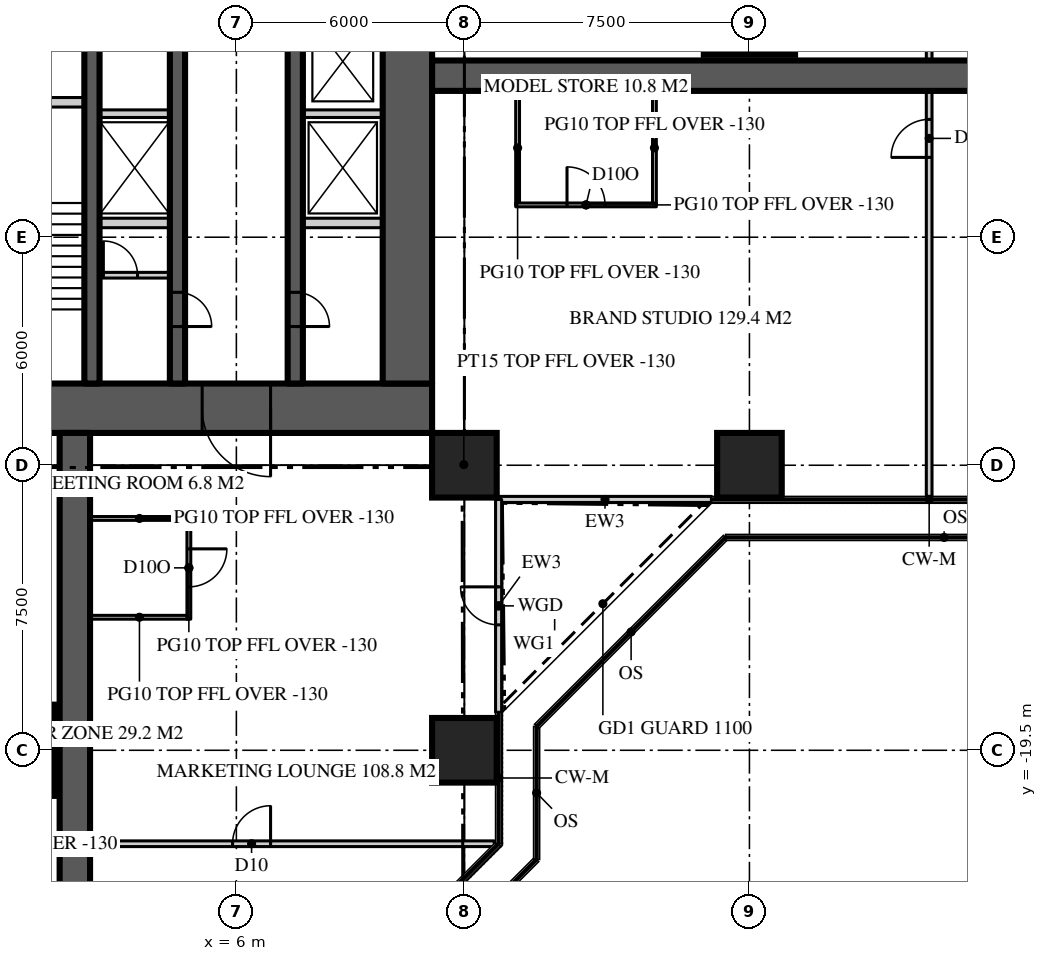
"""IFC4 building model, lengths in metres.
Left out: names, types, materials, properties, quantities, classifications, styles, units other than length and angle.
Written with IfcOpenShell. Run it as: python <this file> out.ifc"""

import sys

from ifc_helpers import new_model, si_unit, direction, frame, frame_2d, origin, origin_2d, place, context, subcontext, project, spatial, rectangle, extrude, element, fill, save


model = new_model("IFC4")
c1 = context("Model", 3, precision=1e-05, world=origin(), true_north=direction((0.0, 1.0)))
c2 = subcontext(c1, "Body", "Model", "MODEL_VIEW")
j1 = project(units=[si_unit("LENGTHUNIT", "METRE"), si_unit("PLANEANGLEUNIT", "RADIAN")], contexts=[c1])
p1 = place(None, origin())
s1 = spatial("IfcSite", under=j1, at=p1, CompositionType="ELEMENT")
p2 = place(p1, origin())
s2 = spatial("IfcBuilding", under=s1, at=p2, CompositionType="ELEMENT")
p3 = place(p2, frame((0.0, 0.0, 190.5)))
s3 = spatial("IfcBuildingStorey", under=s2, at=p3, CompositionType="ELEMENT", Elevation=190.5)
p4 = place(p3, frame((11.15, -10.5, 0.0), z_axis=(0.0, 0.0, 1.0), x_axis=(-1.0, 0.0, 0.0)))
e1 = element("IfcWall", 1, at=p4, inside=s3, PredefinedType="SHEAR", context=c2, shape_type="SweptSolid", body=[
    extrude(rectangle(XDim=22.3, YDim=1.3, at=frame_2d((11.15, 0.0))), origin(), (0.0, 0.0, 1.0), 3.9),
])
p5 = place(p4, frame((16.25, 0.0, 0.0)))
e2 = element("IfcOpeningElement", 2, at=p5, cuts=e1, PredefinedType="OPENING", context=c2, shape_type="SweptSolid", body=[
    extrude(rectangle(XDim=1.8, YDim=2.2, at=frame_2d((0.9, 1.1))), frame((0.0, 0.66, 0.0), z_axis=(0.0, -1.0, 0.0), x_axis=(1.0, 0.0, 0.0)), (0.0, 0.0, 1.0), 1.32),
])
p6 = place(p4, frame((4.25, 0.0, 0.0)))
e3 = element("IfcOpeningElement", 3, at=p6, cuts=e1, PredefinedType="OPENING", context=c2, shape_type="SweptSolid", body=[
    extrude(rectangle(XDim=1.8, YDim=2.2, at=frame_2d((0.9, 1.1))), frame((0.0, 0.66, 0.0), z_axis=(0.0, -1.0, 0.0), x_axis=(1.0, 0.0, 0.0)), (0.0, 0.0, 1.0), 1.32),
])
p7 = place(p3, frame((10.5, -9.85, 0.0), z_axis=(0.0, 0.0, 1.0), x_axis=(0.0, 1.0, 0.0)))
e4 = element("IfcWall", 4, at=p7, inside=s3, PredefinedType="SHEAR", context=c2, shape_type="SweptSolid", body=[
    extrude(rectangle(XDim=19.7, YDim=1.3, at=frame_2d((9.85, 0.0))), origin(), (0.0, 0.0, 1.0), 3.9),
])
p8 = place(p7, frame((17.25, 0.0, 0.0)))
e5 = element("IfcOpeningElement", 5, at=p8, cuts=e4, PredefinedType="OPENING", context=c2, shape_type="SweptSolid", body=[
    extrude(rectangle(XDim=1.0, YDim=2.2, at=frame_2d((0.5, 1.1))), frame((0.0, 0.66, 0.0), z_axis=(0.0, -1.0, 0.0), x_axis=(1.0, 0.0, 0.0)), (0.0, 0.0, 1.0), 1.32),
])
for number, where, z_axis, x_axis in (
    (6, (11.15, -1.75, 0.0), (0.0, 0.0, 1.0), (1.0, 0.0, 0.0)),
    (7, (1.75, -11.15, 0.0), (0.0, 0.0, 1.0), (0.0, -1.0, 0.0)),
):
    element("IfcWall", number, at=place(p3, frame(where, z_axis=z_axis, x_axis=x_axis)), inside=s3, PredefinedType="SHEAR", context=c2, shape_type="SweptSolid", body=[
        extrude(rectangle(XDim=15.25, YDim=0.8, at=frame_2d((7.625, 0.0))), origin(), (0.0, 0.0, 1.0), 3.9),
    ])
p9 = place(p3, frame((0.0, -19.5, 0.0), z_axis=(0.0, 0.0, 1.0), x_axis=(1.0, 0.0, 0.0)))
e8 = element("IfcColumn", 8, at=p9, inside=s3, PredefinedType="COLUMN", context=c2, shape_type="SweptSolid", body=[
    extrude(rectangle(XDim=2.4, YDim=2.4, at=origin_2d()), origin(), (0.0, 0.0, 1.0), 3.9),
])
for number, where, z_axis, x_axis in (
    (9, (12.0, -19.5, 0.0), (0.0, 0.0, 1.0), (1.0, 0.0, 0.0)),
    (10, (12.0, -12.0, 0.0), (0.0, 0.0, 1.0), (1.0, 0.0, 0.0)),
    (11, (19.5, -12.0, 0.0), (0.0, 0.0, 1.0), (1.0, 0.0, 0.0)),
):
    element("IfcColumn", number, at=place(p3, frame(where, z_axis=z_axis, x_axis=x_axis)), inside=s3, PredefinedType="COLUMN", context=c2, shape_type="SweptSolid", body=[
        extrude(rectangle(XDim=1.7, YDim=1.7, at=origin_2d()), origin(), (0.0, 0.0, 1.0), 3.9),
    ])
p10 = place(p3, frame((19.5, 0.0, 0.0), z_axis=(0.0, 0.0, 1.0), x_axis=(1.0, 0.0, 0.0)))
e12 = element("IfcColumn", 12, at=p10, inside=s3, PredefinedType="COLUMN", context=c2, shape_type="SweptSolid", body=[
    extrude(rectangle(XDim=2.4, YDim=2.4, at=origin_2d()), origin(), (0.0, 0.0, 1.0), 3.9),
])
p11 = place(p3, frame((12.9, -12.9, 0.0), z_axis=(0.0, 0.0, 1.0), x_axis=(1.0, 0.0, 0.0)))
e13 = element("IfcWall", 13, at=p11, inside=s3, PredefinedType="SOLIDWALL", context=c2, shape_type="SweptSolid", body=[
    extrude(rectangle(XDim=5.6, YDim=0.16, at=frame_2d((2.8, 0.0))), origin(), (0.0, 0.0, 1.0), 3.77),
])
p12 = place(p3, frame((12.9, -18.5, 0.0), z_axis=(0.0, 0.0, 1.0), x_axis=(0.0, 1.0, 0.0)))
e14 = element("IfcWall", 14, at=p12, inside=s3, PredefinedType="SOLIDWALL", context=c2, shape_type="SweptSolid", body=[
    extrude(rectangle(XDim=5.6, YDim=0.16, at=frame_2d((2.8, 0.0))), origin(), (0.0, 0.0, 1.0), 3.77),
])
p13 = place(p12, frame((2.3, 0.0, 0.0)))
e15 = element("IfcOpeningElement", 15, at=p13, cuts=e14, PredefinedType="OPENING", context=c2, shape_type="SweptSolid", body=[
    extrude(rectangle(XDim=1.0, YDim=2.2, at=frame_2d((0.5, 1.1))), frame((0.0, 0.09, 0.0), z_axis=(0.0, -1.0, 0.0), x_axis=(1.0, 0.0, 0.0)), (0.0, 0.0, 1.0), 0.18),
])
p14 = place(p3, frame((7.55, 9.85, 0.0), z_axis=(0.0, 0.0, 1.0), x_axis=(0.0, -1.0, 0.0)))
e16 = element("IfcWall", 16, at=p14, inside=s3, PredefinedType="SHEAR", context=c2, shape_type="SweptSolid", body=[
    extrude(rectangle(XDim=19.7, YDim=0.4, at=frame_2d((9.85, 0.0))), origin(), (0.0, 0.0, 1.0), 3.9),
])
p15 = place(p14, frame((1.45, 0.0, 0.0)))
e17 = element("IfcOpeningElement", 17, at=p15, cuts=e16, PredefinedType="OPENING", context=c2, shape_type="SweptSolid", body=[
    extrude(rectangle(XDim=1.0, YDim=2.2, at=frame_2d((0.5, 1.1))), frame((0.0, 0.21, 0.0), z_axis=(0.0, -1.0, 0.0), x_axis=(1.0, 0.0, 0.0)), (0.0, 0.0, 1.0), 0.42),
])
p16 = place(p14, frame((17.3, 0.0, 0.0)))
e18 = element("IfcOpeningElement", 18, at=p16, cuts=e16, PredefinedType="OPENING", context=c2, shape_type="SweptSolid", body=[
    extrude(rectangle(XDim=0.9, YDim=2.1, at=frame_2d((0.45, 1.05))), frame((0.0, 0.21, 0.0), z_axis=(0.0, -1.0, 0.0), x_axis=(1.0, 0.0, 0.0)), (0.0, 0.0, 1.0), 0.42),
])
p17 = place(p3, frame((4.45, 9.85, 0.0), z_axis=(0.0, 0.0, 1.0), x_axis=(0.0, -1.0, 0.0)))
e19 = element("IfcWall", 19, at=p17, inside=s3, PredefinedType="SHEAR", context=c2, shape_type="SweptSolid", body=[
    extrude(rectangle(XDim=19.7, YDim=0.4, at=frame_2d((9.85, 0.0))), origin(), (0.0, 0.0, 1.0), 3.9),
])
p18 = place(p17, frame((1.95, 0.0, 0.0)))
e20 = element("IfcOpeningElement", 20, at=p18, cuts=e19, PredefinedType="OPENING", context=c2, shape_type="SweptSolid", body=[
    extrude(rectangle(XDim=1.0, YDim=2.2, at=frame_2d((0.5, 1.1))), frame((0.0, 0.21, 0.0), z_axis=(0.0, -1.0, 0.0), x_axis=(1.0, 0.0, 0.0)), (0.0, 0.0, 1.0), 0.42),
])
p19 = place(p17, frame((17.3, 0.0, 0.0)))
e21 = element("IfcOpeningElement", 21, at=p19, cuts=e19, PredefinedType="OPENING", context=c2, shape_type="SweptSolid", body=[
    extrude(rectangle(XDim=0.9, YDim=2.1, at=frame_2d((0.45, 1.05))), frame((0.0, 0.21, 0.0), z_axis=(0.0, -1.0, 0.0), x_axis=(1.0, 0.0, 0.0)), (0.0, 0.0, 1.0), 0.42),
])
p20 = place(p3, frame((2.2, 9.85, 0.0), z_axis=(0.0, 0.0, 1.0), x_axis=(0.0, -1.0, 0.0)))
e22 = element("IfcWall", 22, at=p20, inside=s3, PredefinedType="SHEAR", context=c2, shape_type="SweptSolid", body=[
    extrude(rectangle(XDim=19.7, YDim=0.4, at=frame_2d((9.85, 0.0))), origin(), (0.0, 0.0, 1.0), 3.9),
])
p21 = place(p20, frame((0.35, 0.0, 0.0)))
e23 = element("IfcOpeningElement", 23, at=p21, cuts=e22, PredefinedType="OPENING", context=c2, shape_type="SweptSolid", body=[
    extrude(rectangle(XDim=1.0, YDim=2.2, at=frame_2d((0.5, 1.1))), frame((0.0, 0.21, 0.0), z_axis=(0.0, -1.0, 0.0), x_axis=(1.0, 0.0, 0.0)), (0.0, 0.0, 1.0), 0.42),
])
p22 = place(p3, frame((2.4, -5.625, 0.0), z_axis=(0.0, 0.0, 1.0), x_axis=(1.0, 0.0, 0.0)))
e24 = element("IfcWall", 24, at=p22, inside=s3, PredefinedType="SOLIDWALL", context=c2, shape_type="SweptSolid", body=[
    extrude(rectangle(XDim=1.85, YDim=0.25, at=frame_2d((0.925, 0.0))), origin(), (0.0, 0.0, 1.0), 3.7),
])
p23 = place(p3, frame((7.75, -5.625, 0.0), z_axis=(0.0, 0.0, 1.0), x_axis=(1.0, 0.0, 0.0)))
e25 = element("IfcWall", 25, at=p23, inside=s3, PredefinedType="SOLIDWALL", context=c2, shape_type="SweptSolid", body=[
    extrude(rectangle(XDim=2.1, YDim=0.25, at=frame_2d((1.05, 0.0))), origin(), (0.0, 0.0, 1.0), 3.7),
])
p24 = place(p3, frame((-2.0, -2.45, 0.0), z_axis=(0.0, 0.0, 1.0), x_axis=(1.0, 0.0, 0.0)))
e26 = element("IfcWall", 26, at=p24, inside=s3, PredefinedType="SOLIDWALL", context=c2, shape_type="SweptSolid", body=[
    extrude(rectangle(XDim=4.0, YDim=0.25, at=frame_2d((2.0, 0.0))), origin(), (0.0, 0.0, 1.0), 3.7),
])
p25 = place(p3, frame((2.4, -2.75, 0.0), z_axis=(0.0, 0.0, 1.0), x_axis=(1.0, 0.0, 0.0)))
e27 = element("IfcWall", 27, at=p25, inside=s3, PredefinedType="SOLIDWALL", context=c2, shape_type="SweptSolid", body=[
    extrude(rectangle(XDim=1.85, YDim=0.2, at=frame_2d((0.925, 0.0))), origin(), (0.0, 0.0, 1.0), 3.7),
])
p26 = place(p3, frame((7.75, -2.75, 0.0), z_axis=(0.0, 0.0, 1.0), x_axis=(1.0, 0.0, 0.0)))
e28 = element("IfcWall", 28, at=p26, inside=s3, PredefinedType="SOLIDWALL", context=c2, shape_type="SweptSolid", body=[
    extrude(rectangle(XDim=2.1, YDim=0.2, at=frame_2d((1.05, 0.0))), origin(), (0.0, 0.0, 1.0), 3.7),
])
p27 = place(p3, frame((24.229, -12.82, 0.0), z_axis=(0.0, 0.0, 1.0), x_axis=(0.0, 1.0, 0.0)))
e29 = element("IfcWall", 29, at=p27, inside=s3, PredefinedType="PARTITIONING", context=c2, shape_type="SweptSolid", body=[
    extrude(rectangle(XDim=25.64, YDim=0.15, at=frame_2d((12.82, 0.0))), origin(), (0.0, 0.0, 1.0), 3.77),
])
p28 = place(p27, frame((15.72, 0.0, 0.0)))
e30 = element("IfcOpeningElement", 30, at=p28, cuts=e29, PredefinedType="OPENING", context=c2, shape_type="SweptSolid", body=[
    extrude(rectangle(XDim=1.0, YDim=2.2, at=frame_2d((0.5, 1.1))), frame((0.0, 0.085, 0.0), z_axis=(0.0, -1.0, 0.0), x_axis=(1.0, 0.0, 0.0)), (0.0, 0.0, 1.0), 0.17),
])
p29 = place(p27, frame((8.92, 0.0, 0.0)))
e31 = element("IfcOpeningElement", 31, at=p29, cuts=e29, PredefinedType="OPENING", context=c2, shape_type="SweptSolid", body=[
    extrude(rectangle(XDim=1.0, YDim=2.2, at=frame_2d((0.5, 1.1))), frame((0.0, 0.085, 0.0), z_axis=(0.0, -1.0, 0.0), x_axis=(1.0, 0.0, 0.0)), (0.0, 0.0, 1.0), 0.17),
])
for number, where, z_axis, x_axis in (
    (32, (13.4, -2.15, 0.0), (0.0, 0.0, 1.0), (0.0, -1.0, 0.0)),
    (33, (17.0, -2.15, 0.0), (0.0, 0.0, 1.0), (0.0, -1.0, 0.0)),
):
    element("IfcWall", number, at=place(p3, frame(where, z_axis=z_axis, x_axis=x_axis)), inside=s3, PredefinedType="PARTITIONING", context=c2, shape_type="SweptSolid", body=[
        extrude(rectangle(XDim=3.0, YDim=0.1, at=frame_2d((1.5, 0.0))), origin(), (0.0, 0.0, 1.0), 3.77),
    ])
p30 = place(p3, frame((13.35, -5.15, 0.0), z_axis=(0.0, 0.0, 1.0), x_axis=(1.0, 0.0, 0.0)))
e34 = element("IfcWall", 34, at=p30, inside=s3, PredefinedType="PARTITIONING", context=c2, shape_type="SweptSolid", body=[
    extrude(rectangle(XDim=3.7, YDim=0.1, at=frame_2d((1.85, 0.0))), origin(), (0.0, 0.0, 1.0), 3.77),
])
p31 = place(p30, frame((1.35, 0.0, 0.0)))
e35 = element("IfcOpeningElement", 35, at=p31, cuts=e34, PredefinedType="OPENING", context=c2, shape_type="SweptSolid", body=[
    extrude(rectangle(XDim=1.0, YDim=2.2, at=frame_2d((0.5, 1.1))), frame((0.0, 0.06, 0.0), z_axis=(0.0, -1.0, 0.0), x_axis=(1.0, 0.0, 0.0)), (0.0, 0.0, 1.0), 0.12),
])
p32 = place(p3, frame((-12.786, -21.959, 0.0), z_axis=(0.0, 0.0, 1.0), x_axis=(1.0, 0.0, 0.0)))
e36 = element("IfcWall", 36, at=p32, inside=s3, PredefinedType="PARTITIONING", context=c2, shape_type="SweptSolid", body=[
    extrude(rectangle(XDim=25.573, YDim=0.15, at=frame_2d((12.786, 0.0))), origin(), (0.0, 0.0, 1.0), 3.77),
])
p33 = place(p32, frame((18.687, 0.0, 0.0)))
e37 = element("IfcOpeningElement", 37, at=p33, cuts=e36, PredefinedType="OPENING", context=c2, shape_type="SweptSolid", body=[
    extrude(rectangle(XDim=1.0, YDim=2.2, at=frame_2d((0.5, 1.1))), frame((0.0, 0.085, 0.0), z_axis=(0.0, -1.0, 0.0), x_axis=(1.0, 0.0, 0.0)), (0.0, 0.0, 1.0), 0.17),
])
p34 = place(p32, frame((5.886, 0.0, 0.0)))
e38 = element("IfcOpeningElement", 38, at=p34, cuts=e36, PredefinedType="OPENING", context=c2, shape_type="SweptSolid", body=[
    extrude(rectangle(XDim=1.0, YDim=2.2, at=frame_2d((0.5, 1.1))), frame((0.0, 0.085, 0.0), z_axis=(0.0, -1.0, 0.0), x_axis=(1.0, 0.0, 0.0)), (0.0, 0.0, 1.0), 0.17),
])
for number, where, z_axis, x_axis in (
    (39, (2.15, -13.4, 0.0), (0.0, 0.0, 1.0), (1.0, 0.0, 0.0)),
    (40, (2.15, -16.0, 0.0), (0.0, 0.0, 1.0), (1.0, 0.0, 0.0)),
):
    element("IfcWall", number, at=place(p3, frame(where, z_axis=z_axis, x_axis=x_axis)), inside=s3, PredefinedType="PARTITIONING", context=c2, shape_type="SweptSolid", body=[
        extrude(rectangle(XDim=2.6, YDim=0.1, at=frame_2d((1.3, 0.0))), origin(), (0.0, 0.0, 1.0), 3.77),
    ])
p35 = place(p3, frame((4.75, -13.35, 0.0), z_axis=(0.0, 0.0, 1.0), x_axis=(0.0, -1.0, 0.0)))
e41 = element("IfcWall", 41, at=p35, inside=s3, PredefinedType="PARTITIONING", context=c2, shape_type="SweptSolid", body=[
    extrude(rectangle(XDim=2.7, YDim=0.1, at=frame_2d((1.35, 0.0))), origin(), (0.0, 0.0, 1.0), 3.77),
])
p36 = place(p35, frame((0.85, 0.0, 0.0)))
e42 = element("IfcOpeningElement", 42, at=p36, cuts=e41, PredefinedType="OPENING", context=c2, shape_type="SweptSolid", body=[
    extrude(rectangle(XDim=1.0, YDim=2.2, at=frame_2d((0.5, 1.1))), frame((0.0, 0.06, 0.0), z_axis=(0.0, -1.0, 0.0), x_axis=(1.0, 0.0, 0.0)), (0.0, 0.0, 1.0), 0.12),
])
p37 = place(p3, frame((11.15, -11.15, 0.0), z_axis=(0.0, 0.0, 1.0), x_axis=(0.707106781187, -0.707106781187, 0.0)))
e43 = element("IfcWall", 43, at=p37, inside=s3, PredefinedType="PARTITIONING", context=c2, shape_type="SweptSolid", body=[
    extrude(rectangle(XDim=2.362, YDim=0.15, at=frame_2d((1.181, 0.0))), origin(), (0.0, 0.0, 1.0), 3.77),
])
p38 = place(p3, frame((2.4, -7.0, 0.0), z_axis=(0.0, 0.0, 1.0), x_axis=(1.0, 0.0, 0.0)))
e44 = element("IfcWall", 44, at=p38, inside=s3, PredefinedType="SOLIDWALL", context=c2, shape_type="SweptSolid", body=[
    extrude(rectangle(XDim=1.85, YDim=0.15, at=frame_2d((0.925, 0.0))), origin(), (0.0, 0.0, 1.0), 3.77),
])
p39 = place(p38, frame((0.1, 0.0, 0.0)))
e45 = element("IfcOpeningElement", 45, at=p39, cuts=e44, PredefinedType="OPENING", context=c2, shape_type="SweptSolid", body=[
    extrude(rectangle(XDim=0.9, YDim=2.1, at=frame_2d((0.45, 1.05))), frame((0.0, 0.085, 0.0), z_axis=(0.0, -1.0, 0.0), x_axis=(1.0, 0.0, 0.0)), (0.0, 0.0, 1.0), 0.17),
])
p40 = place(p13, origin())
e46 = element("IfcDoor", 46, at=p40, inside=s3, OperationType="SINGLE_SWING_RIGHT", PredefinedType="DOOR", context=c2, shape_type="SweptSolid", body=[
    extrude(rectangle(XDim=1.0, YDim=2.2, at=frame_2d((0.5, 1.1))), frame((0.0, 0.025, 0.0), z_axis=(0.0, -1.0, 0.0), x_axis=(1.0, 0.0, 0.0)), (0.0, 0.0, 1.0), 0.05),
])
fill(e15, e46)
p41 = place(p6, origin())
e47 = element("IfcDoor", 47, at=p41, inside=s3, OperationType="DOUBLE_DOOR_DOUBLE_SWING", PredefinedType="DOOR", context=c2, shape_type="SweptSolid", body=[
    extrude(rectangle(XDim=1.8, YDim=2.2, at=frame_2d((0.9, 1.1))), frame((0.0, 0.025, 0.0), z_axis=(0.0, -1.0, 0.0), x_axis=(1.0, 0.0, 0.0)), (0.0, 0.0, 1.0), 0.05),
])
fill(e3, e47)
p42 = place(p16, origin())
e48 = element("IfcDoor", 48, at=p42, inside=s3, OperationType="SINGLE_SWING_RIGHT", PredefinedType="DOOR", context=c2, shape_type="SweptSolid", body=[
    extrude(rectangle(XDim=0.9, YDim=2.1, at=frame_2d((0.45, 1.05))), frame((0.0, 0.025, 0.0), z_axis=(0.0, -1.0, 0.0), x_axis=(1.0, 0.0, 0.0)), (0.0, 0.0, 1.0), 0.05),
])
fill(e18, e48)
p43 = place(p19, origin())
e49 = element("IfcDoor", 49, at=p43, inside=s3, OperationType="SINGLE_SWING_RIGHT", PredefinedType="DOOR", context=c2, shape_type="SweptSolid", body=[
    extrude(rectangle(XDim=0.9, YDim=2.1, at=frame_2d((0.45, 1.05))), frame((0.0, 0.025, 0.0), z_axis=(0.0, -1.0, 0.0), x_axis=(1.0, 0.0, 0.0)), (0.0, 0.0, 1.0), 0.05),
])
fill(e21, e49)
p44 = place(p29, origin())
e50 = element("IfcDoor", 50, at=p44, inside=s3, OperationType="SINGLE_SWING_LEFT", PredefinedType="DOOR", context=c2, shape_type="SweptSolid", body=[
    extrude(rectangle(XDim=1.0, YDim=2.2, at=frame_2d((0.5, 1.1))), frame((0.0, 0.025, 0.0), z_axis=(0.0, -1.0, 0.0), x_axis=(1.0, 0.0, 0.0)), (0.0, 0.0, 1.0), 0.05),
])
fill(e31, e50)
p45 = place(p31, origin())
e51 = element("IfcDoor", 51, at=p45, inside=s3, OperationType="SINGLE_SWING_LEFT", PredefinedType="DOOR", context=c2, shape_type="SweptSolid", body=[
    extrude(rectangle(XDim=1.0, YDim=2.2, at=frame_2d((0.5, 1.1))), frame((0.0, 0.025, 0.0), z_axis=(0.0, -1.0, 0.0), x_axis=(1.0, 0.0, 0.0)), (0.0, 0.0, 1.0), 0.05),
])
fill(e35, e51)
p46 = place(p33, origin())
e52 = element("IfcDoor", 52, at=p46, inside=s3, OperationType="SINGLE_SWING_RIGHT", PredefinedType="DOOR", context=c2, shape_type="SweptSolid", body=[
    extrude(rectangle(XDim=1.0, YDim=2.2, at=frame_2d((0.5, 1.1))), frame((0.0, 0.025, 0.0), z_axis=(0.0, -1.0, 0.0), x_axis=(1.0, 0.0, 0.0)), (0.0, 0.0, 1.0), 0.05),
])
fill(e37, e52)
p47 = place(p36, origin())
e53 = element("IfcDoor", 53, at=p47, inside=s3, OperationType="SINGLE_SWING_LEFT", PredefinedType="DOOR", context=c2, shape_type="SweptSolid", body=[
    extrude(rectangle(XDim=1.0, YDim=2.2, at=frame_2d((0.5, 1.1))), frame((0.0, 0.025, 0.0), z_axis=(0.0, -1.0, 0.0), x_axis=(1.0, 0.0, 0.0)), (0.0, 0.0, 1.0), 0.05),
])
fill(e42, e53)
p48 = place(p39, origin())
e54 = element("IfcDoor", 54, at=p48, inside=s3, OperationType="SINGLE_SWING_LEFT", PredefinedType="DOOR", context=c2, shape_type="SweptSolid", body=[
    extrude(rectangle(XDim=0.9, YDim=2.1, at=frame_2d((0.45, 1.05))), frame((0.0, 0.025, 0.0), z_axis=(0.0, -1.0, 0.0), x_axis=(1.0, 0.0, 0.0)), (0.0, 0.0, 1.0), 0.05),
])
fill(e45, e54)
save(model, sys.argv[1])
